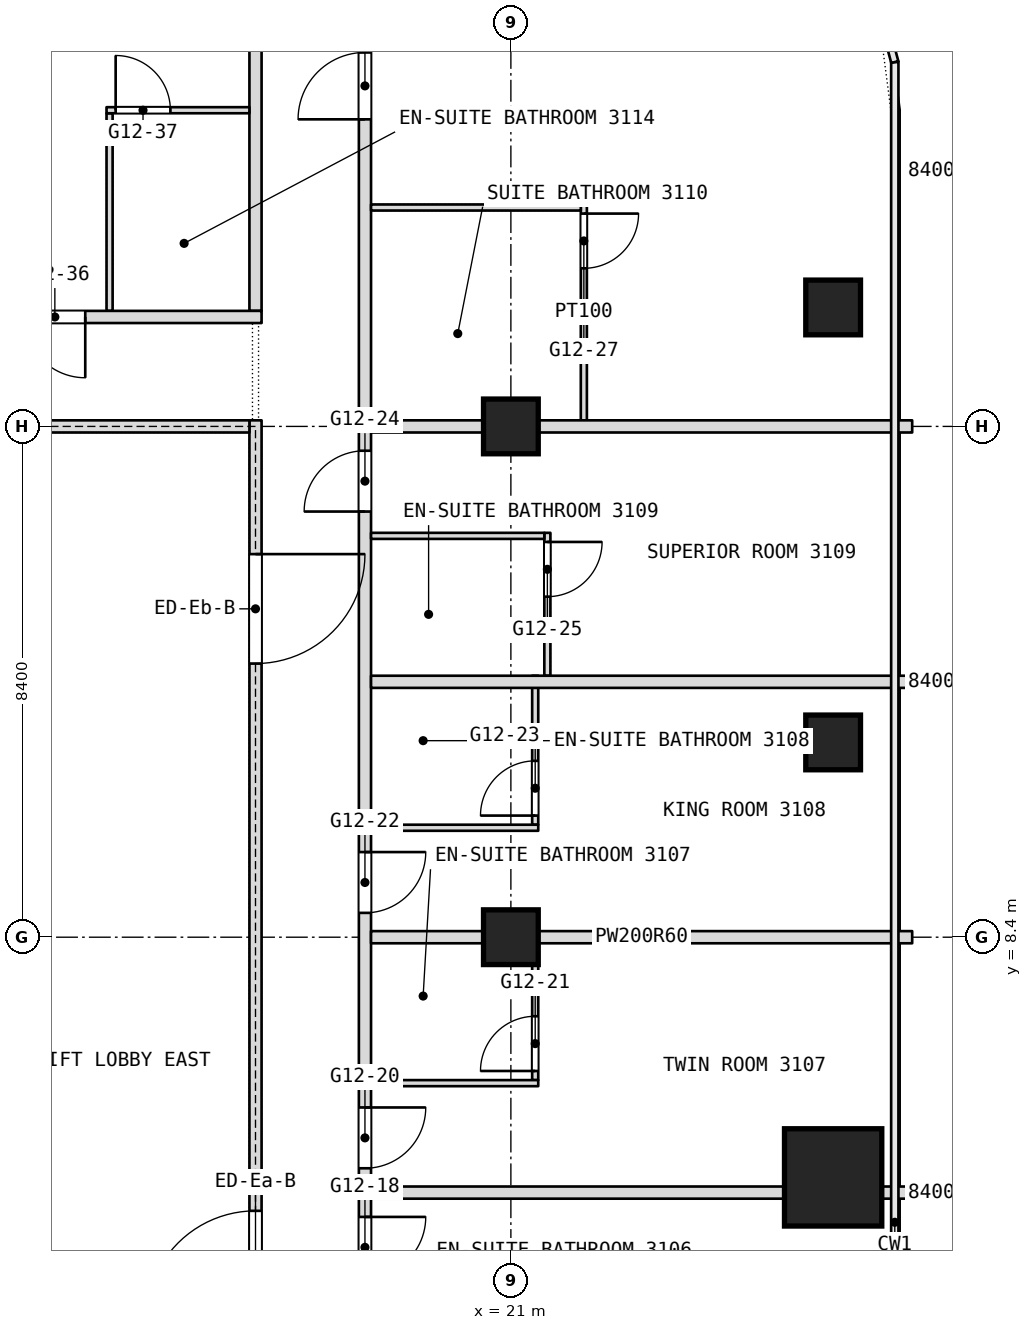
"""IFC4 building model, lengths in metres.
Left out: names, types, materials, properties, quantities, classifications, styles, units other than length and angle.
Written with IfcOpenShell. Run it as: python <this file> out.ifc"""

import sys

from ifc_helpers import new_model, si_unit, direction, frame, frame_2d, origin, origin_2d, place, context, subcontext, project, spatial, rectangle, extrude, element, fill, save


model = new_model("IFC4")
c1 = context("Model", 3, precision=1e-05, world=origin(), true_north=direction((0.0, 1.0)))
c2 = subcontext(c1, "Body", "Model", "MODEL_VIEW")
j1 = project(units=[si_unit("LENGTHUNIT", "METRE"), si_unit("PLANEANGLEUNIT", "RADIAN")], contexts=[c1])
p1 = place(None, origin())
s1 = spatial("IfcSite", under=j1, at=p1, CompositionType="ELEMENT")
p2 = place(p1, origin())
s2 = spatial("IfcBuilding", under=s1, at=p2, CompositionType="ELEMENT")
p3 = place(p2, frame((0.0, 0.0, 137.3)))
s3 = spatial("IfcBuildingStorey", under=s2, at=p3, CompositionType="ELEMENT", Elevation=137.3)
p4 = place(p3, frame((26.3, 4.45, 0.0), z_axis=(0.0, 0.0, 1.0), x_axis=(1.0, 0.0, 0.0)))
e1 = element("IfcColumn", 1, at=p4, inside=s3, PredefinedType="COLUMN", context=c2, shape_type="SweptSolid", body=[
    extrude(rectangle(XDim=1.6, YDim=1.6, at=origin_2d()), origin(), (0.0, 0.0, 1.0), 3.6),
])
for number, where, z_axis, x_axis in (
    (2, (21.0, 8.4, 0.0), (0.0, 0.0, 1.0), (1.0, 0.0, 0.0)),
    (3, (21.0, 16.8, 0.0), (0.0, 0.0, 1.0), (1.0, 0.0, 0.0)),
    (4, (26.3, 18.756, 0.0), (0.0, 0.0, 1.0), (1.0, 0.0, 0.0)),
    (5, (26.3, 11.603, 0.0), (0.0, 0.0, 1.0), (1.0, 0.0, 0.0)),
):
    element("IfcColumn", number, at=place(p3, frame(where, z_axis=z_axis, x_axis=x_axis)), inside=s3, PredefinedType="COLUMN", context=c2, shape_type="SweptSolid", body=[
        extrude(rectangle(XDim=0.9, YDim=0.9, at=origin_2d()), origin(), (0.0, 0.0, 1.0), 3.6),
    ])
p5 = place(p3, frame((22.2, 16.9, 0.0), z_axis=(0.0, 0.0, 1.0), x_axis=(0.0, 1.0, 0.0)))
e6 = element("IfcWall", 6, at=p5, inside=s3, PredefinedType="PARTITIONING", context=c2, shape_type="SweptSolid", body=[
    extrude(rectangle(XDim=3.55, YDim=0.1, at=frame_2d((1.775, 0.0))), origin(), (0.0, 0.0, 1.0), 3.34),
])
p6 = place(p5, frame((2.5, 0.0, 0.0)))
e7 = element("IfcOpeningElement", 7, at=p6, cuts=e6, PredefinedType="OPENING", context=c2, shape_type="SweptSolid", body=[
    extrude(rectangle(XDim=0.9, YDim=2.1, at=frame_2d((0.45, 1.05))), frame((0.0, 0.05, 0.0), z_axis=(0.0, -1.0, 0.0), x_axis=(1.0, 0.0, 0.0)), (0.0, 0.0, 1.0), 0.1),
])
p7 = place(p3, frame((21.6, 12.7, 0.0), z_axis=(0.0, 0.0, 1.0), x_axis=(0.0, 1.0, 0.0)))
e8 = element("IfcWall", 8, at=p7, inside=s3, PredefinedType="PARTITIONING", context=c2, shape_type="SweptSolid", body=[
    extrude(rectangle(XDim=2.35, YDim=0.1, at=frame_2d((1.175, 0.0))), origin(), (0.0, 0.0, 1.0), 3.34),
])
p8 = place(p7, frame((1.3, 0.0, 0.0)))
e9 = element("IfcOpeningElement", 9, at=p8, cuts=e8, PredefinedType="OPENING", context=c2, shape_type="SweptSolid", body=[
    extrude(rectangle(XDim=0.9, YDim=2.1, at=frame_2d((0.45, 1.05))), frame((0.0, 0.05, 0.0), z_axis=(0.0, -1.0, 0.0), x_axis=(1.0, 0.0, 0.0)), (0.0, 0.0, 1.0), 0.1),
])
p9 = place(p3, frame((21.4, 6.05, 0.0), z_axis=(0.0, 0.0, 1.0), x_axis=(0.0, 1.0, 0.0)))
e10 = element("IfcWall", 10, at=p9, inside=s3, PredefinedType="PARTITIONING", context=c2, shape_type="SweptSolid", body=[
    extrude(rectangle(XDim=2.45, YDim=0.1, at=frame_2d((1.225, 0.0))), origin(), (0.0, 0.0, 1.0), 3.34),
])
p10 = place(p9, frame((0.15, 0.0, 0.0)))
e11 = element("IfcOpeningElement", 11, at=p10, cuts=e10, PredefinedType="OPENING", context=c2, shape_type="SweptSolid", body=[
    extrude(rectangle(XDim=0.9, YDim=2.1, at=frame_2d((0.45, 1.05))), frame((0.0, 0.05, 0.0), z_axis=(0.0, -1.0, 0.0), x_axis=(1.0, 0.0, 0.0)), (0.0, 0.0, 1.0), 0.1),
])
p11 = place(p3, frame((21.4, 10.25, 0.0), z_axis=(0.0, 0.0, 1.0), x_axis=(0.0, 1.0, 0.0)))
e12 = element("IfcWall", 12, at=p11, inside=s3, PredefinedType="PARTITIONING", context=c2, shape_type="SweptSolid", body=[
    extrude(rectangle(XDim=2.45, YDim=0.1, at=frame_2d((1.225, 0.0))), origin(), (0.0, 0.0, 1.0), 3.34),
])
p12 = place(p11, frame((0.15, 0.0, 0.0)))
e13 = element("IfcOpeningElement", 13, at=p12, cuts=e12, PredefinedType="OPENING", context=c2, shape_type="SweptSolid", body=[
    extrude(rectangle(XDim=0.9, YDim=2.1, at=frame_2d((0.45, 1.05))), frame((0.0, 0.05, 0.0), z_axis=(0.0, -1.0, 0.0), x_axis=(1.0, 0.0, 0.0)), (0.0, 0.0, 1.0), 0.1),
])
p13 = place(p3, frame((18.6, -21.708, 0.0), z_axis=(0.0, 0.0, 1.0), x_axis=(0.0, 1.0, 0.0)))
e14 = element("IfcWall", 14, at=p13, inside=s3, PredefinedType="PARTITIONING", context=c2, shape_type="SweptSolid", body=[
    extrude(rectangle(XDim=49.648, YDim=0.2, at=frame_2d((24.824, 0.0))), origin(), (0.0, 0.0, 1.0), 3.34),
])
p14 = place(p13, frame((2.8, 0.0, 0.0)))
e15 = element("IfcOpeningElement", 15, at=p14, cuts=e14, PredefinedType="OPENING", context=c2, shape_type="SweptSolid", body=[
    extrude(rectangle(XDim=1.0, YDim=2.1, at=frame_2d((0.5, 1.05))), frame((0.0, 0.1, 0.0), z_axis=(0.0, -1.0, 0.0), x_axis=(1.0, 0.0, 0.0)), (0.0, 0.0, 1.0), 0.2),
])
p15 = place(p13, frame((7.708, 0.0, 0.0)))
e16 = element("IfcOpeningElement", 16, at=p15, cuts=e14, PredefinedType="OPENING", context=c2, shape_type="SweptSolid", body=[
    extrude(rectangle(XDim=1.0, YDim=2.1, at=frame_2d((0.5, 1.05))), frame((0.0, 0.1, 0.0), z_axis=(0.0, -1.0, 0.0), x_axis=(1.0, 0.0, 0.0)), (0.0, 0.0, 1.0), 0.2),
])
p16 = place(p13, frame((9.508, 0.0, 0.0)))
e17 = element("IfcOpeningElement", 17, at=p16, cuts=e14, PredefinedType="OPENING", context=c2, shape_type="SweptSolid", body=[
    extrude(rectangle(XDim=1.0, YDim=2.1, at=frame_2d((0.5, 1.05))), frame((0.0, 0.1, 0.0), z_axis=(0.0, -1.0, 0.0), x_axis=(1.0, 0.0, 0.0)), (0.0, 0.0, 1.0), 0.2),
])
p17 = place(p13, frame((13.708, 0.0, 0.0)))
e18 = element("IfcOpeningElement", 18, at=p17, cuts=e14, PredefinedType="OPENING", context=c2, shape_type="SweptSolid", body=[
    extrude(rectangle(XDim=1.0, YDim=2.1, at=frame_2d((0.5, 1.05))), frame((0.0, 0.1, 0.0), z_axis=(0.0, -1.0, 0.0), x_axis=(1.0, 0.0, 0.0)), (0.0, 0.0, 1.0), 0.2),
])
p18 = place(p13, frame((20.308, 0.0, 0.0)))
e19 = element("IfcOpeningElement", 19, at=p18, cuts=e14, PredefinedType="OPENING", context=c2, shape_type="SweptSolid", body=[
    extrude(rectangle(XDim=1.0, YDim=2.1, at=frame_2d((0.5, 1.05))), frame((0.0, 0.1, 0.0), z_axis=(0.0, -1.0, 0.0), x_axis=(1.0, 0.0, 0.0)), (0.0, 0.0, 1.0), 0.2),
])
p19 = place(p13, frame((24.508, 0.0, 0.0)))
e20 = element("IfcOpeningElement", 20, at=p19, cuts=e14, PredefinedType="OPENING", context=c2, shape_type="SweptSolid", body=[
    extrude(rectangle(XDim=1.0, YDim=2.1, at=frame_2d((0.5, 1.05))), frame((0.0, 0.1, 0.0), z_axis=(0.0, -1.0, 0.0), x_axis=(1.0, 0.0, 0.0)), (0.0, 0.0, 1.0), 0.2),
])
p20 = place(p13, frame((26.308, 0.0, 0.0)))
e21 = element("IfcOpeningElement", 21, at=p20, cuts=e14, PredefinedType="OPENING", context=c2, shape_type="SweptSolid", body=[
    extrude(rectangle(XDim=1.0, YDim=2.1, at=frame_2d((0.5, 1.05))), frame((0.0, 0.1, 0.0), z_axis=(0.0, -1.0, 0.0), x_axis=(1.0, 0.0, 0.0)), (0.0, 0.0, 1.0), 0.2),
])
p21 = place(p13, frame((30.508, 0.0, 0.0)))
e22 = element("IfcOpeningElement", 22, at=p21, cuts=e14, PredefinedType="OPENING", context=c2, shape_type="SweptSolid", body=[
    extrude(rectangle(XDim=1.0, YDim=2.1, at=frame_2d((0.5, 1.05))), frame((0.0, 0.1, 0.0), z_axis=(0.0, -1.0, 0.0), x_axis=(1.0, 0.0, 0.0)), (0.0, 0.0, 1.0), 0.2),
])
p22 = place(p13, frame((37.108, 0.0, 0.0)))
e23 = element("IfcOpeningElement", 23, at=p22, cuts=e14, PredefinedType="OPENING", context=c2, shape_type="SweptSolid", body=[
    extrude(rectangle(XDim=1.0, YDim=2.1, at=frame_2d((0.5, 1.05))), frame((0.0, 0.1, 0.0), z_axis=(0.0, -1.0, 0.0), x_axis=(1.0, 0.0, 0.0)), (0.0, 0.0, 1.0), 0.2),
])
p23 = place(p13, frame((43.558, 0.0, 0.0)))
e24 = element("IfcOpeningElement", 24, at=p23, cuts=e14, PredefinedType="OPENING", context=c2, shape_type="SweptSolid", body=[
    extrude(rectangle(XDim=1.1, YDim=2.1, at=frame_2d((0.55, 1.05))), frame((0.0, 0.1, 0.0), z_axis=(0.0, -1.0, 0.0), x_axis=(1.0, 0.0, 0.0)), (0.0, 0.0, 1.0), 0.2),
])
p24 = place(p3, frame((16.8, 18.7, 0.0), z_axis=(0.0, 0.0, 1.0), x_axis=(0.0, 1.0, 0.0)))
e25 = element("IfcWall", 25, at=p24, inside=s3, PredefinedType="PARTITIONING", context=c2, shape_type="SweptSolid", body=[
    extrude(rectangle(XDim=9.24, YDim=0.2, at=frame_2d((4.62, 0.0))), origin(), (0.0, 0.0, 1.0), 3.34),
])
p25 = place(p3, frame((14.4, 18.7, 0.0), z_axis=(0.0, 0.0, 1.0), x_axis=(0.0, 1.0, 0.0)))
e26 = element("IfcWall", 26, at=p25, inside=s3, PredefinedType="PARTITIONING", context=c2, shape_type="SweptSolid", body=[
    extrude(rectangle(XDim=3.25, YDim=0.1, at=frame_2d((1.625, 0.0))), origin(), (0.0, 0.0, 1.0), 3.34),
])
p26 = place(p3, frame((18.7, 4.2, 0.0), z_axis=(0.0, 0.0, 1.0), x_axis=(1.0, 0.0, 0.0)))
e27 = element("IfcWall", 27, at=p26, inside=s3, PredefinedType="PARTITIONING", context=c2, shape_type="SweptSolid", body=[
    extrude(rectangle(XDim=6.8, YDim=0.2, at=frame_2d((3.4, 0.0))), origin(), (0.0, 0.0, 1.0), 3.34),
])
p27 = place(p3, frame((27.1, 4.2, 0.0), z_axis=(0.0, 0.0, 1.0), x_axis=(1.0, 0.0, 0.0)))
e28 = element("IfcWall", 28, at=p27, inside=s3, PredefinedType="PARTITIONING", context=c2, shape_type="SweptSolid", body=[
    extrude(rectangle(XDim=0.5, YDim=0.2, at=frame_2d((0.25, 0.0))), origin(), (0.0, 0.0, 1.0), 3.34),
])
p28 = place(p3, frame((18.7, 6.0, 0.0), z_axis=(0.0, 0.0, 1.0), x_axis=(1.0, 0.0, 0.0)))
e29 = element("IfcWall", 29, at=p28, inside=s3, PredefinedType="PARTITIONING", context=c2, shape_type="SweptSolid", body=[
    extrude(rectangle(XDim=2.75, YDim=0.1, at=frame_2d((1.375, 0.0))), origin(), (0.0, 0.0, 1.0), 3.34),
])
p29 = place(p3, frame((18.7, 8.4, 0.0), z_axis=(0.0, 0.0, 1.0), x_axis=(1.0, 0.0, 0.0)))
e30 = element("IfcWall", 30, at=p29, inside=s3, PredefinedType="PARTITIONING", context=c2, shape_type="SweptSolid", body=[
    extrude(rectangle(XDim=8.9, YDim=0.2, at=frame_2d((4.45, 0.0))), origin(), (0.0, 0.0, 1.0), 2.89),
])
p30 = place(p3, frame((18.7, 10.2, 0.0), z_axis=(0.0, 0.0, 1.0), x_axis=(1.0, 0.0, 0.0)))
e31 = element("IfcWall", 31, at=p30, inside=s3, PredefinedType="PARTITIONING", context=c2, shape_type="SweptSolid", body=[
    extrude(rectangle(XDim=2.75, YDim=0.1, at=frame_2d((1.375, 0.0))), origin(), (0.0, 0.0, 1.0), 3.34),
])
p31 = place(p3, frame((18.7, 12.6, 0.0), z_axis=(0.0, 0.0, 1.0), x_axis=(1.0, 0.0, 0.0)))
e32 = element("IfcWall", 32, at=p31, inside=s3, PredefinedType="PARTITIONING", context=c2, shape_type="SweptSolid", body=[
    extrude(rectangle(XDim=8.9, YDim=0.2, at=frame_2d((4.45, 0.0))), origin(), (0.0, 0.0, 1.0), 3.34),
])
p32 = place(p3, frame((18.7, 15.0, 0.0), z_axis=(0.0, 0.0, 1.0), x_axis=(1.0, 0.0, 0.0)))
e33 = element("IfcWall", 33, at=p32, inside=s3, PredefinedType="PARTITIONING", context=c2, shape_type="SweptSolid", body=[
    extrude(rectangle(XDim=2.85, YDim=0.1, at=frame_2d((1.425, 0.0))), origin(), (0.0, 0.0, 1.0), 3.34),
])
p33 = place(p3, frame((18.7, 16.8, 0.0), z_axis=(0.0, 0.0, 1.0), x_axis=(1.0, 0.0, 0.0)))
e34 = element("IfcWall", 34, at=p33, inside=s3, PredefinedType="PARTITIONING", context=c2, shape_type="SweptSolid", body=[
    extrude(rectangle(XDim=8.9, YDim=0.2, at=frame_2d((4.45, 0.0))), origin(), (0.0, 0.0, 1.0), 2.89),
])
p34 = place(p3, frame((12.7, 18.6, 0.0), z_axis=(0.0, 0.0, 1.0), x_axis=(1.0, 0.0, 0.0)))
e35 = element("IfcWall", 35, at=p34, inside=s3, PredefinedType="PARTITIONING", context=c2, shape_type="SweptSolid", body=[
    extrude(rectangle(XDim=4.2, YDim=0.2, at=frame_2d((2.1, 0.0))), origin(), (0.0, 0.0, 1.0), 3.34),
])
p35 = place(p34, frame((0.3, 0.0, 0.0)))
e36 = element("IfcOpeningElement", 36, at=p35, cuts=e35, PredefinedType="OPENING", context=c2, shape_type="SweptSolid", body=[
    extrude(rectangle(XDim=1.0, YDim=2.1, at=frame_2d((0.5, 1.05))), frame((0.0, 0.1, 0.0), z_axis=(0.0, -1.0, 0.0), x_axis=(1.0, 0.0, 0.0)), (0.0, 0.0, 1.0), 0.2),
])
p36 = place(p3, frame((18.7, 20.4, 0.0), z_axis=(0.0, 0.0, 1.0), x_axis=(1.0, 0.0, 0.0)))
e37 = element("IfcWall", 37, at=p36, inside=s3, PredefinedType="PARTITIONING", context=c2, shape_type="SweptSolid", body=[
    extrude(rectangle(XDim=3.45, YDim=0.1, at=frame_2d((1.725, 0.0))), origin(), (0.0, 0.0, 1.0), 3.34),
])
p37 = place(p3, frame((14.35, 22.0, 0.0), z_axis=(0.0, 0.0, 1.0), x_axis=(1.0, 0.0, 0.0)))
e38 = element("IfcWall", 38, at=p37, inside=s3, PredefinedType="PARTITIONING", context=c2, shape_type="SweptSolid", body=[
    extrude(rectangle(XDim=2.35, YDim=0.1, at=frame_2d((1.175, 0.0))), origin(), (0.0, 0.0, 1.0), 3.34),
])
p38 = place(p37, frame((0.15, 0.0, 0.0)))
e39 = element("IfcOpeningElement", 39, at=p38, cuts=e38, PredefinedType="OPENING", context=c2, shape_type="SweptSolid", body=[
    extrude(rectangle(XDim=0.9, YDim=2.1, at=frame_2d((0.45, 1.05))), frame((0.0, 0.05, 0.0), z_axis=(0.0, -1.0, 0.0), x_axis=(1.0, 0.0, 0.0)), (0.0, 0.0, 1.0), 0.1),
])
p39 = place(p3, frame((16.8, -0.1, 0.0), z_axis=(0.0, 0.0, 1.0), x_axis=(0.0, 1.0, 0.0)))
e40 = element("IfcWall", 40, at=p39, inside=s3, PredefinedType="PARTITIONING", context=c2, shape_type="SweptSolid", body=[
    extrude(rectangle(XDim=17.0, YDim=0.2, at=frame_2d((8.5, 0.0))), origin(), (0.0, 0.0, 1.0), 3.34),
])
p40 = place(p39, frame((2.2, 0.0, 0.0)))
e41 = element("IfcOpeningElement", 41, at=p40, cuts=e40, PredefinedType="OPENING", context=c2, shape_type="SweptSolid", body=[
    extrude(rectangle(XDim=1.8, YDim=2.1, at=frame_2d((0.9, 1.05))), frame((0.0, 0.1, 0.0), z_axis=(0.0, -1.0, 0.0), x_axis=(1.0, 0.0, 0.0)), (0.0, 0.0, 1.0), 0.2),
])
p41 = place(p39, frame((13.0, 0.0, 0.0)))
e42 = element("IfcOpeningElement", 42, at=p41, cuts=e40, PredefinedType="OPENING", context=c2, shape_type="SweptSolid", body=[
    extrude(rectangle(XDim=1.8, YDim=2.1, at=frame_2d((0.9, 1.05))), frame((0.0, 0.1, 0.0), z_axis=(0.0, -1.0, 0.0), x_axis=(1.0, 0.0, 0.0)), (0.0, 0.0, 1.0), 0.2),
])
p42 = place(p3, frame((12.1, 16.8, 0.0), z_axis=(0.0, 0.0, 1.0), x_axis=(1.0, 0.0, 0.0)))
e43 = element("IfcWall", 43, at=p42, inside=s3, PredefinedType="PARTITIONING", context=c2, shape_type="SweptSolid", body=[
    extrude(rectangle(XDim=4.6, YDim=0.2, at=frame_2d((2.3, 0.0))), origin(), (0.0, 0.0, 1.0), 2.89),
])
p43 = place(p6, origin())
e44 = element("IfcDoor", 44, at=p43, inside=s3, OperationType="SINGLE_SWING_RIGHT", PredefinedType="DOOR", context=c2, shape_type="SweptSolid", body=[
    extrude(rectangle(XDim=0.9, YDim=2.1, at=frame_2d((0.45, 1.05))), frame((0.0, 0.025, 0.0), z_axis=(0.0, -1.0, 0.0), x_axis=(1.0, 0.0, 0.0)), (0.0, 0.0, 1.0), 0.05),
])
fill(e7, e44)
p44 = place(p8, origin())
e45 = element("IfcDoor", 45, at=p44, inside=s3, OperationType="SINGLE_SWING_RIGHT", PredefinedType="DOOR", context=c2, shape_type="SweptSolid", body=[
    extrude(rectangle(XDim=0.9, YDim=2.1, at=frame_2d((0.45, 1.05))), frame((0.0, 0.025, 0.0), z_axis=(0.0, -1.0, 0.0), x_axis=(1.0, 0.0, 0.0)), (0.0, 0.0, 1.0), 0.05),
])
fill(e9, e45)
p45 = place(p10, origin())
e46 = element("IfcDoor", 46, at=p45, inside=s3, OperationType="SINGLE_SWING_LEFT", PredefinedType="DOOR", context=c2, shape_type="SweptSolid", body=[
    extrude(rectangle(XDim=0.9, YDim=2.1, at=frame_2d((0.45, 1.05))), frame((0.0, 0.025, 0.0), z_axis=(0.0, -1.0, 0.0), x_axis=(1.0, 0.0, 0.0)), (0.0, 0.0, 1.0), 0.05),
])
fill(e11, e46)
p46 = place(p12, origin())
e47 = element("IfcDoor", 47, at=p46, inside=s3, OperationType="SINGLE_SWING_LEFT", PredefinedType="DOOR", context=c2, shape_type="SweptSolid", body=[
    extrude(rectangle(XDim=0.9, YDim=2.1, at=frame_2d((0.45, 1.05))), frame((0.0, 0.025, 0.0), z_axis=(0.0, -1.0, 0.0), x_axis=(1.0, 0.0, 0.0)), (0.0, 0.0, 1.0), 0.05),
])
fill(e13, e47)
p47 = place(p19, origin())
e48 = element("IfcDoor", 48, at=p47, inside=s3, OperationType="SINGLE_SWING_RIGHT", PredefinedType="DOOR", context=c2, shape_type="SweptSolid", body=[
    extrude(rectangle(XDim=1.0, YDim=2.1, at=frame_2d((0.5, 1.05))), frame((0.0, 0.025, 0.0), z_axis=(0.0, -1.0, 0.0), x_axis=(1.0, 0.0, 0.0)), (0.0, 0.0, 1.0), 0.05),
])
fill(e20, e48)
p48 = place(p20, origin())
e49 = element("IfcDoor", 49, at=p48, inside=s3, OperationType="SINGLE_SWING_RIGHT", PredefinedType="DOOR", context=c2, shape_type="SweptSolid", body=[
    extrude(rectangle(XDim=1.0, YDim=2.1, at=frame_2d((0.5, 1.05))), frame((0.0, 0.025, 0.0), z_axis=(0.0, -1.0, 0.0), x_axis=(1.0, 0.0, 0.0)), (0.0, 0.0, 1.0), 0.05),
])
fill(e21, e49)
p49 = place(p21, origin())
e50 = element("IfcDoor", 50, at=p49, inside=s3, OperationType="SINGLE_SWING_RIGHT", PredefinedType="DOOR", context=c2, shape_type="SweptSolid", body=[
    extrude(rectangle(XDim=1.0, YDim=2.1, at=frame_2d((0.5, 1.05))), frame((0.0, 0.025, 0.0), z_axis=(0.0, -1.0, 0.0), x_axis=(1.0, 0.0, 0.0)), (0.0, 0.0, 1.0), 0.05),
])
fill(e22, e50)
p50 = place(p22, origin())
e51 = element("IfcDoor", 51, at=p50, inside=s3, OperationType="SINGLE_SWING_RIGHT", PredefinedType="DOOR", context=c2, shape_type="SweptSolid", body=[
    extrude(rectangle(XDim=1.0, YDim=2.1, at=frame_2d((0.5, 1.05))), frame((0.0, 0.025, 0.0), z_axis=(0.0, -1.0, 0.0), x_axis=(1.0, 0.0, 0.0)), (0.0, 0.0, 1.0), 0.05),
])
fill(e23, e51)
p51 = place(p23, origin())
e52 = element("IfcDoor", 52, at=p51, inside=s3, OperationType="SINGLE_SWING_RIGHT", PredefinedType="DOOR", context=c2, shape_type="SweptSolid", body=[
    extrude(rectangle(XDim=1.1, YDim=2.1, at=frame_2d((0.55, 1.05))), frame((0.0, 0.025, 0.0), z_axis=(0.0, -1.0, 0.0), x_axis=(1.0, 0.0, 0.0)), (0.0, 0.0, 1.0), 0.05),
])
fill(e24, e52)
p52 = place(p35, origin())
e53 = element("IfcDoor", 53, at=p52, inside=s3, OperationType="SINGLE_SWING_LEFT", PredefinedType="DOOR", context=c2, shape_type="SweptSolid", body=[
    extrude(rectangle(XDim=1.0, YDim=2.1, at=frame_2d((0.5, 1.05))), frame((0.0, 0.025, 0.0), z_axis=(0.0, -1.0, 0.0), x_axis=(1.0, 0.0, 0.0)), (0.0, 0.0, 1.0), 0.05),
])
fill(e36, e53)
p53 = place(p38, origin())
e54 = element("IfcDoor", 54, at=p53, inside=s3, OperationType="SINGLE_SWING_RIGHT", PredefinedType="DOOR", context=c2, shape_type="SweptSolid", body=[
    extrude(rectangle(XDim=0.9, YDim=2.1, at=frame_2d((0.45, 1.05))), frame((0.0, 0.025, 0.0), z_axis=(0.0, -1.0, 0.0), x_axis=(1.0, 0.0, 0.0)), (0.0, 0.0, 1.0), 0.05),
])
fill(e39, e54)
p54 = place(p40, origin())
e55 = element("IfcDoor", 55, at=p54, inside=s3, OperationType="DOUBLE_DOOR_SINGLE_SWING", PredefinedType="DOOR", context=c2, shape_type="SweptSolid", body=[
    extrude(rectangle(XDim=1.8, YDim=2.1, at=frame_2d((0.9, 1.05))), frame((0.0, 0.025, 0.0), z_axis=(0.0, -1.0, 0.0), x_axis=(1.0, 0.0, 0.0)), (0.0, 0.0, 1.0), 0.05),
])
fill(e41, e55)
p55 = place(p41, origin())
e56 = element("IfcDoor", 56, at=p55, inside=s3, OperationType="DOUBLE_DOOR_SINGLE_SWING", PredefinedType="DOOR", context=c2, shape_type="SweptSolid", body=[
    extrude(rectangle(XDim=1.8, YDim=2.1, at=frame_2d((0.9, 1.05))), frame((0.0, 0.025, 0.0), z_axis=(0.0, -1.0, 0.0), x_axis=(1.0, 0.0, 0.0)), (0.0, 0.0, 1.0), 0.05),
])
fill(e42, e56)
save(model, sys.argv[1])
